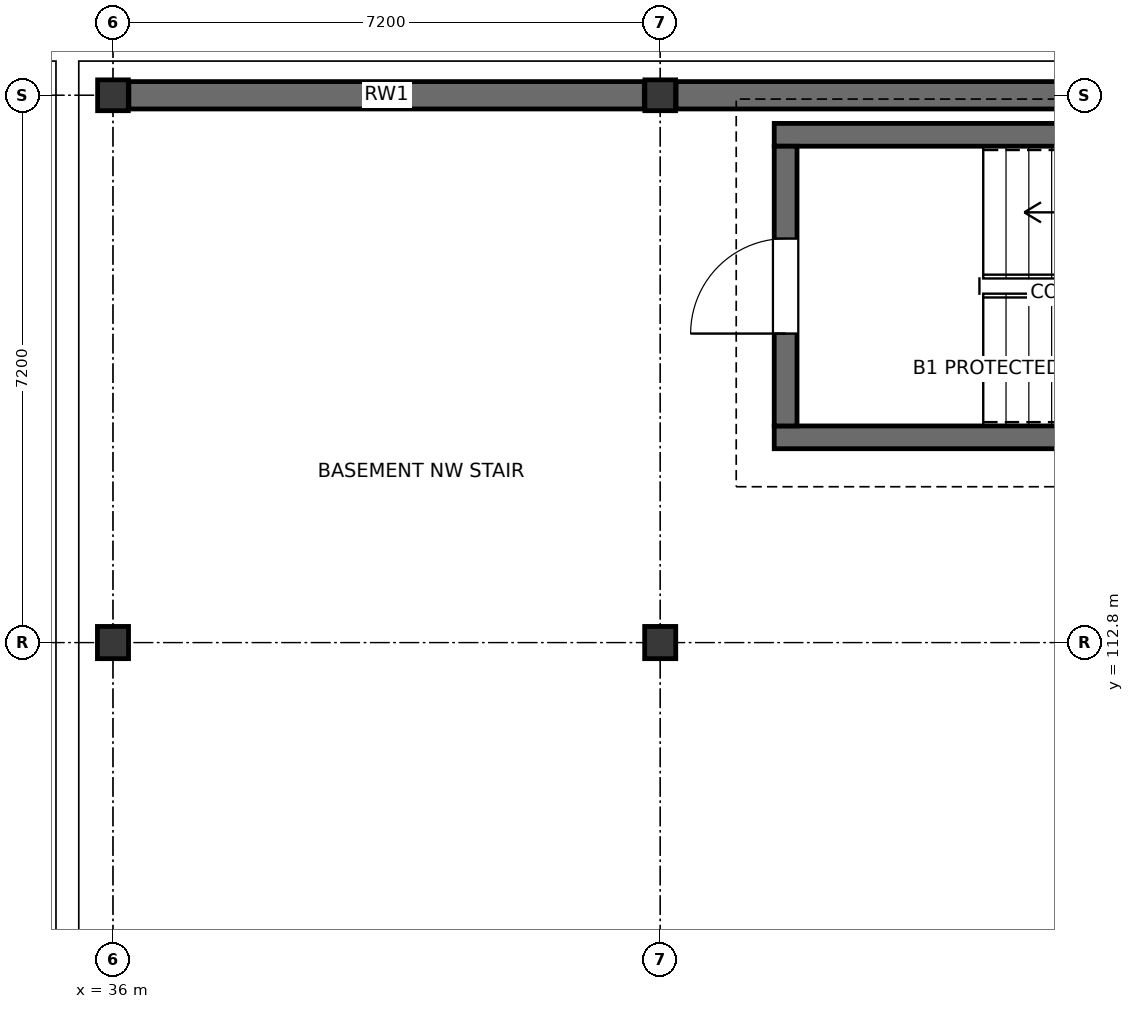
"""IFC4 building model, lengths in metres.
Left out: names, types, materials, properties, quantities, classifications, styles, units other than length and angle.
Written with IfcOpenShell. Run it as: python <this file> out.ifc"""

import sys

from ifc_helpers import new_model, si_unit, direction, frame, frame_2d, origin, origin_2d, place, context, subcontext, project, spatial, rectangle, i_section, extrude, element, fill, save


model = new_model("IFC4")
c1 = context("Model", 3, precision=1e-05, world=origin(), true_north=direction((0.0, 1.0)))
c2 = subcontext(c1, "Body", "Model", "MODEL_VIEW")
j1 = project(units=[si_unit("LENGTHUNIT", "METRE"), si_unit("PLANEANGLEUNIT", "RADIAN")], contexts=[c1])
p1 = place(None, origin())
s1 = spatial("IfcSite", under=j1, at=p1, CompositionType="ELEMENT")
p2 = place(p1, origin())
s2 = spatial("IfcBuilding", under=s1, at=p2, CompositionType="ELEMENT")
p3 = place(p2, frame((0.0, 0.0, -4.5)))
s3 = spatial("IfcBuildingStorey", under=s2, at=p3, CompositionType="ELEMENT", Elevation=-4.5)
p4 = place(p3, frame((36.0, 112.8, 0.0), z_axis=(0.0, 0.0, 1.0), x_axis=(1.0, 0.0, 0.0)))
e1 = element("IfcColumn", 1, at=p4, inside=s3, PredefinedType="COLUMN", context=c2, shape_type="SweptSolid", body=[
    extrude(i_section(OverallWidth=0.409, OverallDepth=0.424, WebThickness=0.033, FlangeThickness=0.052, FilletRadius=0.015, at=origin_2d()), origin(), (0.0, 0.0, 1.0), 4.5),
])
p5 = place(p3, frame((36.0, 120.0, 0.0), z_axis=(0.0, 0.0, 1.0), x_axis=(1.0, 0.0, 0.0)))
e2 = element("IfcColumn", 2, at=p5, inside=s3, PredefinedType="COLUMN", context=c2, shape_type="SweptSolid", body=[
    extrude(i_section(OverallWidth=0.404, OverallDepth=0.406, WebThickness=0.027, FlangeThickness=0.044, FilletRadius=0.015, at=origin_2d()), origin(), (0.0, 0.0, 1.0), 4.5),
])
p6 = place(p3, frame((43.2, 112.8, 0.0), z_axis=(0.0, 0.0, 1.0), x_axis=(1.0, 0.0, 0.0)))
e3 = element("IfcColumn", 3, at=p6, inside=s3, PredefinedType="COLUMN", context=c2, shape_type="SweptSolid", body=[
    extrude(i_section(OverallWidth=0.409, OverallDepth=0.424, WebThickness=0.033, FlangeThickness=0.052, FilletRadius=0.015, at=origin_2d()), origin(), (0.0, 0.0, 1.0), 4.5),
])
p7 = place(p3, frame((43.2, 120.0, 0.0), z_axis=(0.0, 0.0, 1.0), x_axis=(1.0, 0.0, 0.0)))
e4 = element("IfcColumn", 4, at=p7, inside=s3, PredefinedType="COLUMN", context=c2, shape_type="SweptSolid", body=[
    extrude(i_section(OverallWidth=0.404, OverallDepth=0.406, WebThickness=0.027, FlangeThickness=0.044, FilletRadius=0.015, at=origin_2d()), origin(), (0.0, 0.0, 1.0), 4.5),
])
for number, where, z_axis, x_axis in (
    (5, (36.209, 120.0, 0.0), (0.0, 0.0, 1.0), (1.0, 0.0, 0.0)),
    (6, (43.409, 120.0, 0.0), (0.0, 0.0, 1.0), (1.0, 0.0, 0.0)),
):
    element("IfcWall", number, at=place(p3, frame(where, z_axis=z_axis, x_axis=x_axis)), inside=s3, PredefinedType="SOLIDWALL", context=c2, shape_type="SweptSolid", body=[
        extrude(rectangle(XDim=6.782, YDim=0.36, at=frame_2d((3.391, 0.0))), origin(), (0.0, 0.0, 1.0), 3.448),
    ])
for number, where, z_axis, x_axis in (
    (7, (54.1, 115.5, 0.0), (0.0, 0.0, 1.0), (-1.0, 0.0, 0.0)),
    (8, (44.7, 119.48, 0.0), (0.0, 0.0, 1.0), (1.0, 0.0, 0.0)),
):
    element("IfcWall", number, at=place(p3, frame(where, z_axis=z_axis, x_axis=x_axis)), inside=s3, PredefinedType="SOLIDWALL", context=c2, shape_type="SweptSolid", body=[
        extrude(rectangle(XDim=9.4, YDim=0.3, at=frame_2d((4.7, 0.0))), origin(), (0.0, 0.0, 1.0), 4.22),
    ])
p8 = place(p3, frame((44.85, 115.65, 0.0), z_axis=(0.0, 0.0, 1.0), x_axis=(0.0, 1.0, 0.0)))
e9 = element("IfcWall", 9, at=p8, inside=s3, PredefinedType="SOLIDWALL", context=c2, shape_type="SweptSolid", body=[
    extrude(rectangle(XDim=3.68, YDim=0.3, at=frame_2d((1.84, 0.0))), origin(), (0.0, 0.0, 1.0), 4.22),
])
p9 = place(p8, frame((1.215, 0.0, 0.0)))
e10 = element("IfcOpeningElement", 10, at=p9, cuts=e9, PredefinedType="OPENING", context=c2, shape_type="SweptSolid", body=[
    extrude(rectangle(XDim=1.25, YDim=2.2, at=frame_2d((0.625, 1.1))), frame((0.0, 0.16, 0.0), z_axis=(0.0, -1.0, 0.0), x_axis=(1.0, 0.0, 0.0)), (0.0, 0.0, 1.0), 0.32),
])
p10 = place(p9, origin())
e11 = element("IfcDoor", 11, at=p10, inside=s3, OperationType="SINGLE_SWING_LEFT", PredefinedType="DOOR", context=c2, shape_type="SweptSolid", body=[
    extrude(rectangle(XDim=1.25, YDim=2.2, at=frame_2d((0.625, 1.1))), frame((0.0, 0.025, 0.0), z_axis=(0.0, -1.0, 0.0), x_axis=(1.0, 0.0, 0.0)), (0.0, 0.0, 1.0), 0.05),
])
fill(e10, e11)
save(model, sys.argv[1])
